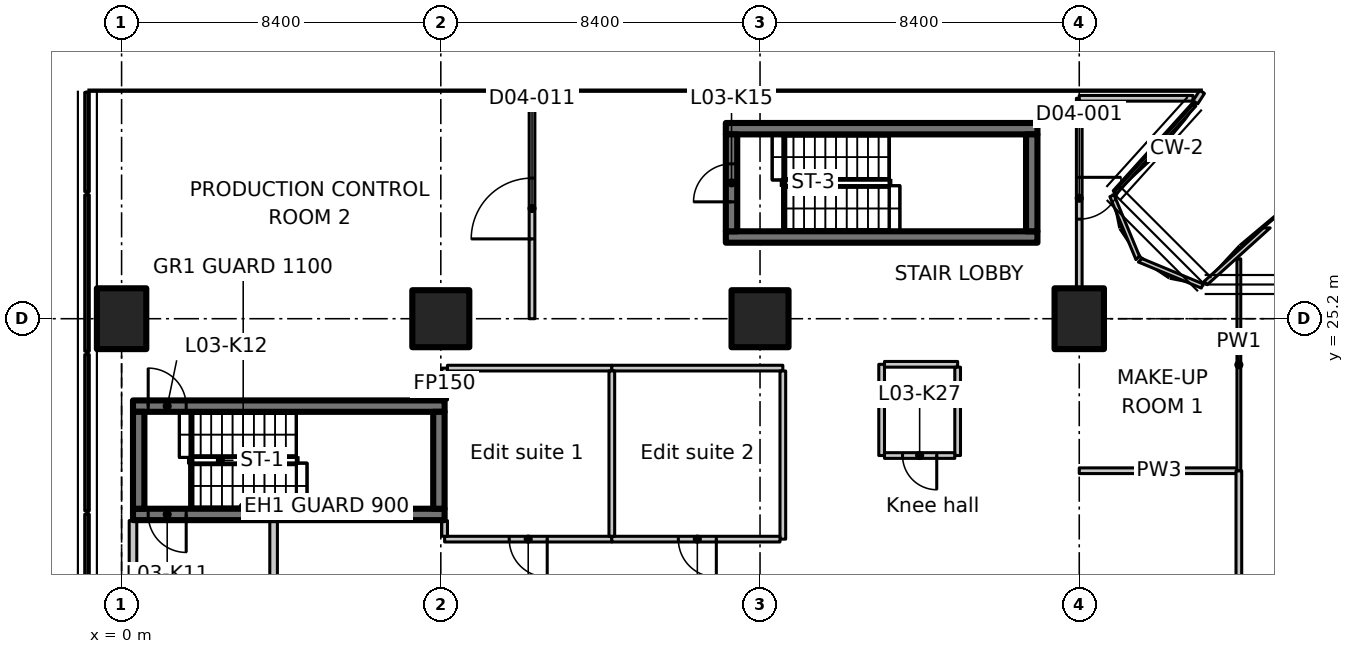
"""IFC4 building model, lengths in metres.
Left out: names, types, materials, properties, quantities, classifications, styles, units other than length and angle.
Written with IfcOpenShell. Run it as: python <this file> out.ifc"""

import sys

from ifc_helpers import new_model, si_unit, direction, frame, frame_2d, origin, origin_2d, place, context, subcontext, project, spatial, polyline, rectangle, outline, extrude, element, fill, save


model = new_model("IFC4")
c1 = context("Model", 3, precision=1e-05, world=origin(), true_north=direction((0.0, 1.0)))
c2 = subcontext(c1, "Body", "Model", "MODEL_VIEW")
j1 = project(units=[si_unit("LENGTHUNIT", "METRE"), si_unit("PLANEANGLEUNIT", "RADIAN")], contexts=[c1])
p1 = place(None, origin())
s1 = spatial("IfcSite", under=j1, at=p1, CompositionType="ELEMENT")
p2 = place(p1, origin())
s2 = spatial("IfcBuilding", under=s1, at=p2, CompositionType="ELEMENT")
p3 = place(p2, frame((0.0, 0.0, 20.0)))
s3 = spatial("IfcBuildingStorey", under=s2, at=p3, CompositionType="ELEMENT", Elevation=20.0)
p4 = place(p3, frame((0.0, 25.2, 0.0), z_axis=(0.0, 0.0, 1.0), x_axis=(1.0, 0.0, 0.0)))
e1 = element("IfcColumn", 1, at=p4, inside=s3, PredefinedType="COLUMN", context=c2, shape_type="SweptSolid", body=[
    extrude(rectangle(XDim=1.3, YDim=1.6, at=origin_2d()), origin(), (0.0, 0.0, 1.0), 7.25),
])
for number, where, z_axis, x_axis in (
    (2, (8.4, 25.2, 0.0), (0.0, 0.0, 1.0), (1.0, 0.0, 0.0)),
    (3, (16.8, 25.2, 0.0), (0.0, 0.0, 1.0), (1.0, 0.0, 0.0)),
):
    element("IfcColumn", number, at=place(p3, frame(where, z_axis=z_axis, x_axis=x_axis)), inside=s3, PredefinedType="COLUMN", context=c2, shape_type="SweptSolid", body=[
        extrude(rectangle(XDim=1.5, YDim=1.5, at=origin_2d()), origin(), (0.0, 0.0, 1.0), 7.25),
    ])
p5 = place(p3, frame((25.2, 25.2, 0.0), z_axis=(0.0, 0.0, 1.0), x_axis=(1.0, 0.0, 0.0)))
e4 = element("IfcColumn", 4, at=p5, inside=s3, PredefinedType="COLUMN", context=c2, shape_type="SweptSolid", body=[
    extrude(rectangle(XDim=1.3, YDim=1.6, at=origin_2d()), origin(), (0.0, 0.0, 1.0), 7.25),
])
p6 = place(p2, origin())
s4 = spatial("IfcBuildingStorey", under=s2, at=p6, CompositionType="ELEMENT", Elevation=0.0)
for number, where, z_axis, x_axis in (
    (5, (0.6, 32.4, -6.3), (0.0, 0.0, 1.0), (1.0, 0.0, 0.0)),
    (6, (9.0, 32.4, -6.3), (0.0, 0.0, 1.0), (1.0, 0.0, 0.0)),
):
    element("IfcWall", number, at=place(p6, frame(where, z_axis=z_axis, x_axis=x_axis)), inside=s4, PredefinedType="SOLIDWALL", context=c2, shape_type="SweptSolid", body=[
        extrude(rectangle(XDim=7.2, YDim=2.4, at=frame_2d((3.6, 0.0))), origin(), (0.0, 0.0, 1.0), 42.55),
    ])
p7 = place(p6, frame((17.4, 32.4, -6.3), z_axis=(0.0, 0.0, 1.0), x_axis=(1.0, 0.0, 0.0)))
e7 = element("IfcWall", 7, at=p7, inside=s4, PredefinedType="SOLIDWALL", context=c2, shape_type="SweptSolid", body=[
    extrude(rectangle(XDim=7.2, YDim=2.4, at=frame_2d((3.6, 0.0))), origin(), (0.0, 0.0, 1.0), 42.55),
])
p8 = place(p3, origin())
e8 = element("IfcWall", 8, at=p8, inside=s3, PredefinedType="SOLIDWALL", context=c2, shape_type="SweptSolid", body=[
    extrude(outline(polyline([(30.224, 27.59), (30.045, 27.59), (28.487, 26.182), (28.567, 26.093), (30.224, 27.59)])), origin(), (0.0, 0.0, 1.0), 7.5),
])
p9 = place(p3, origin())
e9 = element("IfcWall", 9, at=p9, inside=s3, PredefinedType="SOLIDWALL", context=c2, shape_type="SweptSolid", body=[
    extrude(outline(polyline([(28.412, 26.005), (28.458, 26.116), (26.847, 26.783), (26.755, 26.692), (28.412, 26.005)])), origin(), (0.0, 0.0, 1.0), 7.5),
])
p10 = place(p3, origin())
e10 = element("IfcWall", 10, at=p10, inside=s3, PredefinedType="SOLIDWALL", context=c2, shape_type="SweptSolid", body=[
    extrude(outline(polyline([(26.692, 26.755), (26.783, 26.847), (26.116, 28.458), (26.005, 28.412), (26.692, 26.755)])), origin(), (0.0, 0.0, 1.0), 7.5),
])
p11 = place(p3, origin())
e11 = element("IfcWall", 11, at=p11, inside=s3, PredefinedType="SOLIDWALL", context=c2, shape_type="SweptSolid", body=[
    extrude(outline(polyline([(26.093, 28.567), (26.182, 28.487), (28.267, 30.795), (28.167, 30.862), (26.093, 28.567)])), origin(), (0.0, 0.0, 1.0), 7.5),
])
p12 = place(p3, origin())
e12 = element("IfcWall", 12, at=p12, inside=s3, PredefinedType="SOLIDWALL", context=c2, shape_type="SweptSolid", body=[
    extrude(outline(polyline([(-0.97, 28.545), (-0.85, 28.545), (-0.85, 31.155), (-0.97, 31.155), (-0.97, 28.545)])), origin(), (0.0, 0.0, 1.0), 7.5),
])
p13 = place(p3, origin())
e13 = element("IfcWall", 13, at=p13, inside=s3, PredefinedType="SOLIDWALL", context=c2, shape_type="SweptSolid", body=[
    extrude(outline(polyline([(-0.97, 24.345), (-0.85, 24.345), (-0.85, 28.455), (-0.97, 28.455), (-0.97, 24.345)])), origin(), (0.0, 0.0, 1.0), 7.5),
])
p14 = place(p3, origin())
e14 = element("IfcWall", 14, at=p14, inside=s3, PredefinedType="SOLIDWALL", context=c2, shape_type="SweptSolid", body=[
    extrude(outline(polyline([(-0.97, 20.145), (-0.85, 20.145), (-0.85, 24.255), (-0.97, 24.255), (-0.97, 20.145)])), origin(), (0.0, 0.0, 1.0), 7.5),
])
p15 = place(p3, origin())
e15 = element("IfcWall", 15, at=p15, inside=s3, PredefinedType="SOLIDWALL", context=c2, shape_type="SweptSolid", body=[
    extrude(outline(polyline([(-0.97, 15.945), (-0.85, 15.945), (-0.85, 20.055), (-0.97, 20.055), (-0.97, 15.945)])), origin(), (0.0, 0.0, 1.0), 7.5),
])
p16 = place(p3, frame((8.5, 20.05, 0.0), z_axis=(0.0, 0.0, 1.0), x_axis=(-1.0, 0.0, 0.0)))
e16 = element("IfcWall", 16, at=p16, inside=s3, PredefinedType="SHEAR", context=c2, shape_type="SweptSolid", body=[
    extrude(rectangle(XDim=8.2, YDim=0.3, at=frame_2d((4.1, 0.0))), origin(), (0.0, 0.0, 1.0), 7.25),
])
p17 = place(p16, frame((6.8, 0.0, 0.0)))
e17 = element("IfcOpeningElement", 17, at=p17, cuts=e16, PredefinedType="OPENING", context=c2, shape_type="SweptSolid", body=[
    extrude(rectangle(XDim=1.0, YDim=2.1, at=frame_2d((0.5, 1.05))), frame((0.0, 0.16, 0.0), z_axis=(0.0, -1.0, 0.0), x_axis=(1.0, 0.0, 0.0)), (0.0, 0.0, 1.0), 0.32),
])
p18 = place(p3, frame((0.3, 22.9, 0.0), z_axis=(0.0, 0.0, 1.0), x_axis=(1.0, 0.0, 0.0)))
e18 = element("IfcWall", 18, at=p18, inside=s3, PredefinedType="SHEAR", context=c2, shape_type="SweptSolid", body=[
    extrude(rectangle(XDim=8.2, YDim=0.3, at=frame_2d((4.1, 0.0))), origin(), (0.0, 0.0, 1.0), 7.25),
])
p19 = place(p18, frame((0.4, 0.0, 0.0)))
e19 = element("IfcOpeningElement", 19, at=p19, cuts=e18, PredefinedType="OPENING", context=c2, shape_type="SweptSolid", body=[
    extrude(rectangle(XDim=1.0, YDim=2.1, at=frame_2d((0.5, 1.05))), frame((0.0, 0.16, 0.0), z_axis=(0.0, -1.0, 0.0), x_axis=(1.0, 0.0, 0.0)), (0.0, 0.0, 1.0), 0.32),
])
for number, where, z_axis, x_axis in (
    (20, (0.45, 20.2, 0.0), (0.0, 0.0, 1.0), (0.0, 1.0, 0.0)),
    (21, (8.35, 20.2, 0.0), (0.0, 0.0, 1.0), (0.0, 1.0, 0.0)),
):
    element("IfcWall", number, at=place(p3, frame(where, z_axis=z_axis, x_axis=x_axis)), inside=s3, PredefinedType="SHEAR", context=c2, shape_type="SweptSolid", body=[
        extrude(rectangle(XDim=2.55, YDim=0.3, at=frame_2d((1.275, 0.0))), origin(), (0.0, 0.0, 1.0), 7.25),
    ])
for number, where, z_axis, x_axis in (
    (22, (15.9, 27.35, 0.0), (0.0, 0.0, 1.0), (1.0, 0.0, 0.0)),
    (23, (15.9, 30.2, 0.0), (0.0, 0.0, 1.0), (1.0, 0.0, 0.0)),
):
    element("IfcWall", number, at=place(p3, frame(where, z_axis=z_axis, x_axis=x_axis)), inside=s3, PredefinedType="SHEAR", context=c2, shape_type="SweptSolid", body=[
        extrude(rectangle(XDim=8.2, YDim=0.3, at=frame_2d((4.1, 0.0))), origin(), (0.0, 0.0, 1.0), 7.25),
    ])
p20 = place(p3, frame((16.05, 27.5, 0.0), z_axis=(0.0, 0.0, 1.0), x_axis=(0.0, 1.0, 0.0)))
e24 = element("IfcWall", 24, at=p20, inside=s3, PredefinedType="SHEAR", context=c2, shape_type="SweptSolid", body=[
    extrude(rectangle(XDim=2.55, YDim=0.3, at=frame_2d((1.275, 0.0))), origin(), (0.0, 0.0, 1.0), 7.25),
])
p21 = place(p20, frame((0.775, 0.0, 0.0)))
e25 = element("IfcOpeningElement", 25, at=p21, cuts=e24, PredefinedType="OPENING", context=c2, shape_type="SweptSolid", body=[
    extrude(rectangle(XDim=1.0, YDim=2.1, at=frame_2d((0.5, 1.05))), frame((0.0, 0.16, 0.0), z_axis=(0.0, -1.0, 0.0), x_axis=(1.0, 0.0, 0.0)), (0.0, 0.0, 1.0), 0.32),
])
p22 = place(p3, frame((23.95, 27.5, 0.0), z_axis=(0.0, 0.0, 1.0), x_axis=(0.0, 1.0, 0.0)))
e26 = element("IfcWall", 26, at=p22, inside=s3, PredefinedType="SHEAR", context=c2, shape_type="SweptSolid", body=[
    extrude(rectangle(XDim=2.55, YDim=0.3, at=frame_2d((1.275, 0.0))), origin(), (0.0, 0.0, 1.0), 7.25),
])
p23 = place(p3, frame((0.3, 16.812, 0.0), z_axis=(0.0, 0.0, 1.0), x_axis=(0.0, 1.0, 0.0)))
e27 = element("IfcWall", 27, at=p23, inside=s3, PredefinedType="PARTITIONING", context=c2, shape_type="SweptSolid", body=[
    extrude(rectangle(XDim=3.076, YDim=0.2, at=frame_2d((1.538, 0.0))), origin(), (0.0, 0.0, 1.0), 6.88),
])
p24 = place(p3, frame((4.0, 19.888, 0.0), z_axis=(0.0, 0.0, 1.0), x_axis=(0.0, -1.0, 0.0)))
e28 = element("IfcWall", 28, at=p24, inside=s3, PredefinedType="PARTITIONING", context=c2, shape_type="SweptSolid", body=[
    extrude(rectangle(XDim=3.076, YDim=0.2, at=frame_2d((1.538, 0.0))), origin(), (0.0, 0.0, 1.0), 7.25),
])
p25 = place(p24, frame((1.488, 0.0, 0.0)))
e29 = element("IfcOpeningElement", 29, at=p25, cuts=e28, PredefinedType="OPENING", context=c2, shape_type="SweptSolid", body=[
    extrude(rectangle(XDim=1.0, YDim=2.1, at=frame_2d((0.5, 1.05))), frame((0.0, 0.11, 0.0), z_axis=(0.0, -1.0, 0.0), x_axis=(1.0, 0.0, 0.0)), (0.0, 0.0, 1.0), 0.22),
])
p26 = place(p3, frame((12.9, 19.4, 0.0), z_axis=(0.0, 0.0, 1.0), x_axis=(-1.0, 0.0, 0.0)))
e30 = element("IfcWall", 30, at=p26, inside=s3, PredefinedType="PARTITIONING", context=c2, shape_type="SweptSolid", body=[
    extrude(rectangle(XDim=4.4, YDim=0.15, at=frame_2d((2.2, 0.0))), origin(), (0.0, 0.0, 1.0), 7.25),
])
p27 = place(p26, frame((1.7, 0.0, 0.0)))
e31 = element("IfcOpeningElement", 31, at=p27, cuts=e30, PredefinedType="OPENING", context=c2, shape_type="SweptSolid", body=[
    extrude(rectangle(XDim=1.0, YDim=2.1, at=frame_2d((0.5, 1.05))), frame((0.0, 0.085, 0.0), z_axis=(0.0, -1.0, 0.0), x_axis=(1.0, 0.0, 0.0)), (0.0, 0.0, 1.0), 0.17),
])
p28 = place(p3, frame((8.5, 19.475, 0.0), z_axis=(0.0, 0.0, 1.0), x_axis=(0.0, 1.0, 0.0)))
e32 = element("IfcWall", 32, at=p28, inside=s3, PredefinedType="PARTITIONING", context=c2, shape_type="SweptSolid", body=[
    extrude(rectangle(XDim=0.413, YDim=0.15, at=frame_2d((0.207, 0.0))), origin(), (0.0, 0.0, 1.0), 7.25),
])
p29 = place(p3, frame((8.5, 23.062, 0.0), z_axis=(0.0, 0.0, 1.0), x_axis=(0.0, 1.0, 0.0)))
e33 = element("IfcWall", 33, at=p29, inside=s3, PredefinedType="PARTITIONING", context=c2, shape_type="SweptSolid", body=[
    extrude(rectangle(XDim=0.838, YDim=0.15, at=frame_2d((0.419, 0.0))), origin(), (0.0, 0.0, 1.0), 7.25),
])
p30 = place(p3, frame((8.575, 23.9, 0.0), z_axis=(0.0, 0.0, 1.0), x_axis=(1.0, 0.0, 0.0)))
e34 = element("IfcWall", 34, at=p30, inside=s3, PredefinedType="PARTITIONING", context=c2, shape_type="SweptSolid", body=[
    extrude(rectangle(XDim=4.325, YDim=0.15, at=frame_2d((2.163, 0.0))), origin(), (0.0, 0.0, 1.0), 7.25),
])
p31 = place(p3, frame((12.9, 23.9, 0.0), z_axis=(0.0, 0.0, 1.0), x_axis=(1.0, 0.0, 0.0)))
e35 = element("IfcWall", 35, at=p31, inside=s3, PredefinedType="PARTITIONING", context=c2, shape_type="SweptSolid", body=[
    extrude(rectangle(XDim=4.5, YDim=0.15, at=frame_2d((2.25, 0.0))), origin(), (0.0, 0.0, 1.0), 7.25),
])
p32 = place(p3, frame((17.4, 23.825, 0.0), z_axis=(0.0, 0.0, 1.0), x_axis=(0.0, -1.0, 0.0)))
e36 = element("IfcWall", 36, at=p32, inside=s3, PredefinedType="PARTITIONING", context=c2, shape_type="SweptSolid", body=[
    extrude(rectangle(XDim=4.425, YDim=0.15, at=frame_2d((2.212, 0.0))), origin(), (0.0, 0.0, 1.0), 7.25),
])
p33 = place(p3, frame((17.325, 19.4, 0.0), z_axis=(0.0, 0.0, 1.0), x_axis=(-1.0, 0.0, 0.0)))
e37 = element("IfcWall", 37, at=p33, inside=s3, PredefinedType="PARTITIONING", context=c2, shape_type="SweptSolid", body=[
    extrude(rectangle(XDim=4.425, YDim=0.15, at=frame_2d((2.212, 0.0))), origin(), (0.0, 0.0, 1.0), 7.25),
])
p34 = place(p33, frame((1.675, 0.0, 0.0)))
e38 = element("IfcOpeningElement", 38, at=p34, cuts=e37, PredefinedType="OPENING", context=c2, shape_type="SweptSolid", body=[
    extrude(rectangle(XDim=1.0, YDim=2.1, at=frame_2d((0.5, 1.05))), frame((0.0, 0.085, 0.0), z_axis=(0.0, -1.0, 0.0), x_axis=(1.0, 0.0, 0.0)), (0.0, 0.0, 1.0), 0.17),
])
p35 = place(p3, frame((12.9, 23.825, 0.0), z_axis=(0.0, 0.0, 1.0), x_axis=(0.0, -1.0, 0.0)))
e39 = element("IfcWall", 39, at=p35, inside=s3, PredefinedType="PARTITIONING", context=c2, shape_type="SweptSolid", body=[
    extrude(rectangle(XDim=4.35, YDim=0.15, at=frame_2d((2.175, 0.0))), origin(), (0.0, 0.0, 1.0), 7.25),
])
p36 = place(p3, frame((20.0, 21.6, 0.0), z_axis=(0.0, 0.0, 1.0), x_axis=(0.0, 1.0, 0.0)))
e40 = element("IfcWall", 40, at=p36, inside=s3, PredefinedType="PARTITIONING", context=c2, shape_type="SweptSolid", body=[
    extrude(rectangle(XDim=2.4, YDim=0.15, at=frame_2d((1.2, 0.0))), origin(), (0.0, 0.0, 1.0), 7.25),
])
p37 = place(p3, frame((20.075, 24.0, 0.0), z_axis=(0.0, 0.0, 1.0), x_axis=(1.0, 0.0, 0.0)))
e41 = element("IfcWall", 41, at=p37, inside=s3, PredefinedType="PARTITIONING", context=c2, shape_type="SweptSolid", body=[
    extrude(rectangle(XDim=1.925, YDim=0.15, at=frame_2d((0.962, 0.0))), origin(), (0.0, 0.0, 1.0), 7.25),
])
p38 = place(p3, frame((22.0, 23.925, 0.0), z_axis=(0.0, 0.0, 1.0), x_axis=(0.0, -1.0, 0.0)))
e42 = element("IfcWall", 42, at=p38, inside=s3, PredefinedType="PARTITIONING", context=c2, shape_type="SweptSolid", body=[
    extrude(rectangle(XDim=2.325, YDim=0.15, at=frame_2d((1.163, 0.0))), origin(), (0.0, 0.0, 1.0), 7.25),
])
p39 = place(p3, frame((21.925, 21.6, 0.0), z_axis=(0.0, 0.0, 1.0), x_axis=(-1.0, 0.0, 0.0)))
e43 = element("IfcWall", 43, at=p39, inside=s3, PredefinedType="PARTITIONING", context=c2, shape_type="SweptSolid", body=[
    extrude(rectangle(XDim=1.85, YDim=0.15, at=frame_2d((0.925, 0.0))), origin(), (0.0, 0.0, 1.0), 7.25),
])
p40 = place(p39, frame((0.475, 0.0, 0.0)))
e44 = element("IfcOpeningElement", 44, at=p40, cuts=e43, PredefinedType="OPENING", context=c2, shape_type="SweptSolid", body=[
    extrude(rectangle(XDim=0.9, YDim=2.1, at=frame_2d((0.45, 1.05))), frame((0.0, 0.085, 0.0), z_axis=(0.0, -1.0, 0.0), x_axis=(1.0, 0.0, 0.0)), (0.0, 0.0, 1.0), 0.17),
])
p41 = place(p3, frame((25.2, 21.2, 0.0), z_axis=(0.0, 0.0, 1.0), x_axis=(1.0, 0.0, 0.0)))
e45 = element("IfcWall", 45, at=p41, inside=s3, PredefinedType="PARTITIONING", context=c2, shape_type="SweptSolid", body=[
    extrude(rectangle(XDim=4.2, YDim=0.15, at=frame_2d((2.1, 0.0))), origin(), (0.0, 0.0, 1.0), 7.23),
])
p42 = place(p3, frame((29.4, 21.2, 0.0), z_axis=(0.0, 0.0, 1.0), x_axis=(0.0, -1.0, 0.0)))
e46 = element("IfcWall", 46, at=p42, inside=s3, PredefinedType="PARTITIONING", context=c2, shape_type="SweptSolid", body=[
    extrude(rectangle(XDim=8.2, YDim=0.15, at=frame_2d((4.1, 0.0))), origin(), (0.0, 0.0, 1.0), 7.23),
])
p43 = place(p3, frame((29.4, 26.776, 0.0), z_axis=(0.0, 0.0, 1.0), x_axis=(0.0, -1.0, 0.0)))
e47 = element("IfcWall", 47, at=p43, inside=s3, PredefinedType="PARTITIONING", context=c2, shape_type="SweptSolid", body=[
    extrude(outline(polyline([(0.0, 0.0), (5.576, 0.0), (5.576, 7.23), (2.026, 7.23), (2.024, 6.88), (1.128, 6.88), (1.126, 7.23), (0.0, 7.23), (0.0, 0.0)])), frame((0.0, 0.05, 0.0), z_axis=(0.0, -1.0, 0.0), x_axis=(1.0, 0.0, 0.0)), (0.0, 0.0, 1.0), 0.1),
])
p44 = place(p3, frame((25.2, 31.0, 0.0), z_axis=(0.0, 0.0, 1.0), x_axis=(0.0, -1.0, 0.0)))
e48 = element("IfcWall", 48, at=p44, inside=s3, PredefinedType="PARTITIONING", context=c2, shape_type="SweptSolid", body=[
    extrude(rectangle(XDim=4.98, YDim=0.15, at=frame_2d((2.49, 0.0))), origin(), (0.0, 0.0, 1.0), 7.23),
])
p45 = place(p44, frame((2.08, 0.0, 0.0)))
e49 = element("IfcOpeningElement", 49, at=p45, cuts=e48, PredefinedType="OPENING", context=c2, shape_type="SweptSolid", body=[
    extrude(rectangle(XDim=1.1, YDim=2.1, at=frame_2d((0.55, 1.05))), frame((0.0, 0.085, 0.0), z_axis=(0.0, -1.0, 0.0), x_axis=(1.0, 0.0, 0.0)), (0.0, 0.0, 1.0), 0.17),
])
p46 = place(p3, frame((25.2, 31.0, 0.0), z_axis=(0.0, 0.0, 1.0), x_axis=(1.0, 0.0, 0.0)))
e50 = element("IfcWall", 50, at=p46, inside=s3, PredefinedType="PARTITIONING", context=c2, shape_type="SweptSolid", body=[
    extrude(rectangle(XDim=2.994, YDim=0.15, at=frame_2d((1.497, 0.0))), origin(), (0.0, 0.0, 1.0), 7.23),
])
p47 = place(p3, frame((28.432, 31.168, 0.0), z_axis=(0.0, 0.0, 1.0), x_axis=(-0.541288698077, -0.840836812547, 0.0)))
e51 = element("IfcWall", 51, at=p47, inside=s3, PredefinedType="PARTITIONING", context=c2, shape_type="SweptSolid", body=[
    extrude(rectangle(XDim=0.325, YDim=0.15, at=frame_2d((0.163, 0.0))), origin(), (0.0, 0.0, 1.0), 7.23),
])
p48 = place(p3, frame((10.8, 25.2, 0.0), z_axis=(0.0, 0.0, 1.0), x_axis=(0.0, 1.0, 0.0)))
e52 = element("IfcWall", 52, at=p48, inside=s3, PredefinedType="PARTITIONING", context=c2, shape_type="SweptSolid", body=[
    extrude(rectangle(XDim=6.0, YDim=0.15, at=frame_2d((3.0, 0.0))), origin(), (0.0, 0.0, 1.0), 7.23),
])
p49 = place(p48, frame((2.1, 0.0, 0.0)))
e53 = element("IfcOpeningElement", 53, at=p49, cuts=e52, PredefinedType="OPENING", context=c2, shape_type="SweptSolid", body=[
    extrude(rectangle(XDim=1.6, YDim=2.1, at=frame_2d((0.8, 1.05))), frame((0.0, 0.085, 0.0), z_axis=(0.0, -1.0, 0.0), x_axis=(1.0, 0.0, 0.0)), (0.0, 0.0, 1.0), 0.17),
])
p50 = place(p17, origin())
e54 = element("IfcDoor", 54, at=p50, inside=s3, OperationType="SINGLE_SWING_RIGHT", PredefinedType="DOOR", context=c2, shape_type="SweptSolid", body=[
    extrude(rectangle(XDim=1.0, YDim=2.1, at=frame_2d((0.5, 1.05))), frame((0.0, 0.025, 0.0), z_axis=(0.0, -1.0, 0.0), x_axis=(1.0, 0.0, 0.0)), (0.0, 0.0, 1.0), 0.05),
])
fill(e17, e54)
p51 = place(p19, origin())
e55 = element("IfcDoor", 55, at=p51, inside=s3, OperationType="SINGLE_SWING_LEFT", PredefinedType="DOOR", context=c2, shape_type="SweptSolid", body=[
    extrude(rectangle(XDim=1.0, YDim=2.1, at=frame_2d((0.5, 1.05))), frame((0.0, 0.025, 0.0), z_axis=(0.0, -1.0, 0.0), x_axis=(1.0, 0.0, 0.0)), (0.0, 0.0, 1.0), 0.05),
])
fill(e19, e55)
p52 = place(p21, origin())
e56 = element("IfcDoor", 56, at=p52, inside=s3, OperationType="SINGLE_SWING_RIGHT", PredefinedType="DOOR", context=c2, shape_type="SweptSolid", body=[
    extrude(rectangle(XDim=1.0, YDim=2.1, at=frame_2d((0.5, 1.05))), frame((0.0, 0.025, 0.0), z_axis=(0.0, -1.0, 0.0), x_axis=(1.0, 0.0, 0.0)), (0.0, 0.0, 1.0), 0.05),
])
fill(e25, e56)
p53 = place(p40, origin())
e57 = element("IfcDoor", 57, at=p53, inside=s3, OperationType="SINGLE_SWING_RIGHT", PredefinedType="DOOR", context=c2, shape_type="SweptSolid", body=[
    extrude(rectangle(XDim=0.9, YDim=2.1, at=frame_2d((0.45, 1.05))), frame((0.0, 0.025, 0.0), z_axis=(0.0, -1.0, 0.0), x_axis=(1.0, 0.0, 0.0)), (0.0, 0.0, 1.0), 0.05),
])
fill(e44, e57)
p54 = place(p27, origin())
e58 = element("IfcDoor", 58, at=p54, inside=s3, OperationType="SINGLE_SWING_LEFT", PredefinedType="DOOR", context=c2, shape_type="SweptSolid", body=[
    extrude(rectangle(XDim=1.0, YDim=2.1, at=frame_2d((0.5, 1.05))), frame((0.0, 0.025, 0.0), z_axis=(0.0, -1.0, 0.0), x_axis=(1.0, 0.0, 0.0)), (0.0, 0.0, 1.0), 0.05),
])
fill(e31, e58)
p55 = place(p34, origin())
e59 = element("IfcDoor", 59, at=p55, inside=s3, OperationType="SINGLE_SWING_RIGHT", PredefinedType="DOOR", context=c2, shape_type="SweptSolid", body=[
    extrude(rectangle(XDim=1.0, YDim=2.1, at=frame_2d((0.5, 1.05))), frame((0.0, 0.025, 0.0), z_axis=(0.0, -1.0, 0.0), x_axis=(1.0, 0.0, 0.0)), (0.0, 0.0, 1.0), 0.05),
])
fill(e38, e59)
p56 = place(p45, origin())
e60 = element("IfcDoor", 60, at=p56, inside=s3, OperationType="SINGLE_SWING_RIGHT", PredefinedType="DOOR", context=c2, shape_type="SweptSolid", body=[
    extrude(rectangle(XDim=1.1, YDim=2.1, at=frame_2d((0.55, 1.05))), frame((0.0, 0.025, 0.0), z_axis=(0.0, -1.0, 0.0), x_axis=(1.0, 0.0, 0.0)), (0.0, 0.0, 1.0), 0.05),
])
fill(e49, e60)
p57 = place(p49, origin())
e61 = element("IfcDoor", 61, at=p57, inside=s3, OperationType="DOUBLE_DOOR_SINGLE_SWING", PredefinedType="DOOR", context=c2, shape_type="SweptSolid", body=[
    extrude(rectangle(XDim=1.6, YDim=2.1, at=frame_2d((0.8, 1.05))), frame((0.0, 0.025, 0.0), z_axis=(0.0, -1.0, 0.0), x_axis=(1.0, 0.0, 0.0)), (0.0, 0.0, 1.0), 0.05),
])
fill(e53, e61)
save(model, sys.argv[1])
